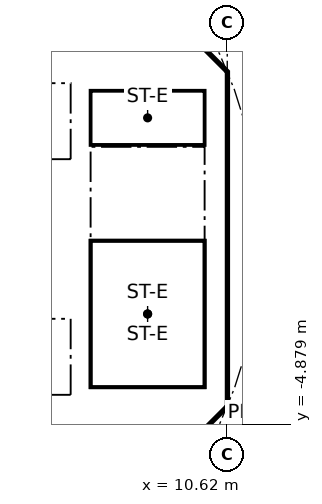
"""IFC4 building model, lengths in metres.
Left out: names, types, materials, properties, quantities, classifications, styles, units other than length and angle.
Written with IfcOpenShell. Run it as: python <this file> out.ifc"""

import sys

from ifc_helpers import new_model, si_unit, direction, frame, frame_2d, origin, place, context, subcontext, project, spatial, polyline, rectangle, outline, extrude, element, fill, save


model = new_model("IFC4")
c1 = context("Model", 3, precision=1e-05, world=origin(), true_north=direction((0.0, 1.0)))
c2 = subcontext(c1, "Body", "Model", "MODEL_VIEW")
j1 = project(units=[si_unit("LENGTHUNIT", "METRE"), si_unit("PLANEANGLEUNIT", "RADIAN")], contexts=[c1])
p1 = place(None, origin())
s1 = spatial("IfcSite", under=j1, at=p1, CompositionType="ELEMENT")
p2 = place(p1, origin())
s2 = spatial("IfcBuilding", under=s1, at=p2, CompositionType="ELEMENT")
p3 = place(p2, origin())
s3 = spatial("IfcBuildingStorey", under=s2, at=p3, CompositionType="ELEMENT", Elevation=0.0)
p4 = place(p3, frame((10.325, -3.801, 0.0), z_axis=(0.0, 0.0, 1.0), x_axis=(0.0, 1.0, 0.0)))
e1 = element("IfcWall", 1, at=p4, inside=s3, PredefinedType="SHEAR", context=c2, shape_type="SweptSolid", body=[
    extrude(rectangle(XDim=7.602, YDim=0.6, at=frame_2d((3.801, 0.0))), origin(), (0.0, 0.0, 1.0), 6.7),
])
p5 = place(p4, frame((6.351, 0.0, 0.0)))
e2 = element("IfcOpeningElement", 2, at=p5, cuts=e1, PredefinedType="OPENING", context=c2, shape_type="SweptSolid", body=[
    extrude(rectangle(XDim=1.1, YDim=2.1, at=frame_2d((0.55, 1.05))), frame((0.0, 0.31, 0.0), z_axis=(0.0, -1.0, 0.0), x_axis=(1.0, 0.0, 0.0)), (0.0, 0.0, 1.0), 0.62),
])
p6 = place(p3, frame((9.988, 4.613, 0.0), z_axis=(0.0, 0.0, 1.0), x_axis=(-0.707106781187, 0.707106781187, 0.0)))
e3 = element("IfcWall", 3, at=p6, inside=s3, PredefinedType="SHEAR", context=c2, shape_type="SweptSolid", body=[
    extrude(rectangle(XDim=7.602, YDim=0.6, at=frame_2d((3.801, 0.0))), origin(), (0.0, 0.0, 1.0), 6.7),
])
p7 = place(p6, frame((3.201, 0.0, 0.0)))
e4 = element("IfcOpeningElement", 4, at=p7, cuts=e3, PredefinedType="OPENING", context=c2, shape_type="SweptSolid", body=[
    extrude(rectangle(XDim=1.2, YDim=2.1, at=frame_2d((0.6, 1.05))), frame((0.0, 0.31, 0.0), z_axis=(0.0, -1.0, 0.0), x_axis=(1.0, 0.0, 0.0)), (0.0, 0.0, 1.0), 0.62),
])
p8 = place(p3, frame((4.613, -9.988, 0.0), z_axis=(0.0, 0.0, 1.0), x_axis=(0.707106781187, 0.707106781187, 0.0)))
e5 = element("IfcWall", 5, at=p8, inside=s3, PredefinedType="SHEAR", context=c2, shape_type="SweptSolid", body=[
    extrude(rectangle(XDim=7.602, YDim=0.6, at=frame_2d((3.801, 0.0))), origin(), (0.0, 0.0, 1.0), 6.7),
])
p9 = place(p8, frame((3.201, 0.0, 0.0)))
e6 = element("IfcOpeningElement", 6, at=p9, cuts=e5, PredefinedType="OPENING", context=c2, shape_type="SweptSolid", body=[
    extrude(rectangle(XDim=1.2, YDim=2.1, at=frame_2d((0.6, 1.05))), frame((0.0, 0.31, 0.0), z_axis=(0.0, -1.0, 0.0), x_axis=(1.0, 0.0, 0.0)), (0.0, 0.0, 1.0), 0.62),
])
p10 = place(p3, frame((-6.7, 2.0, 0.0), z_axis=(0.0, 0.0, 1.0), x_axis=(1.0, 0.0, 0.0)))
e7 = element("IfcWall", 7, at=p10, inside=s3, PredefinedType="SOLIDWALL", context=c2, shape_type="SweptSolid", body=[
    extrude(rectangle(XDim=13.4, YDim=0.2, at=frame_2d((6.7, 0.0))), origin(), (0.0, 0.0, 1.0), 6.7),
])
p11 = place(p10, frame((0.65, 0.0, 0.0)))
e8 = element("IfcOpeningElement", 8, at=p11, cuts=e7, PredefinedType="OPENING", context=c2, shape_type="SweptSolid", body=[
    extrude(rectangle(XDim=1.1, YDim=2.1, at=frame_2d((0.55, 1.05))), frame((0.0, 0.11, 0.0), z_axis=(0.0, -1.0, 0.0), x_axis=(1.0, 0.0, 0.0)), (0.0, 0.0, 1.0), 0.22),
])
p12 = place(p10, frame((2.85, 0.0, 0.0)))
e9 = element("IfcOpeningElement", 9, at=p12, cuts=e7, PredefinedType="OPENING", context=c2, shape_type="SweptSolid", body=[
    extrude(rectangle(XDim=1.1, YDim=2.1, at=frame_2d((0.55, 1.05))), frame((0.0, 0.11, 0.0), z_axis=(0.0, -1.0, 0.0), x_axis=(1.0, 0.0, 0.0)), (0.0, 0.0, 1.0), 0.22),
])
p13 = place(p10, frame((5.05, 0.0, 0.0)))
e10 = element("IfcOpeningElement", 10, at=p13, cuts=e7, PredefinedType="OPENING", context=c2, shape_type="SweptSolid", body=[
    extrude(rectangle(XDim=1.1, YDim=2.1, at=frame_2d((0.55, 1.05))), frame((0.0, 0.11, 0.0), z_axis=(0.0, -1.0, 0.0), x_axis=(1.0, 0.0, 0.0)), (0.0, 0.0, 1.0), 0.22),
])
p14 = place(p10, frame((7.25, 0.0, 0.0)))
e11 = element("IfcOpeningElement", 11, at=p14, cuts=e7, PredefinedType="OPENING", context=c2, shape_type="SweptSolid", body=[
    extrude(rectangle(XDim=1.1, YDim=2.1, at=frame_2d((0.55, 1.05))), frame((0.0, 0.11, 0.0), z_axis=(0.0, -1.0, 0.0), x_axis=(1.0, 0.0, 0.0)), (0.0, 0.0, 1.0), 0.22),
])
p15 = place(p10, frame((9.45, 0.0, 0.0)))
e12 = element("IfcOpeningElement", 12, at=p15, cuts=e7, PredefinedType="OPENING", context=c2, shape_type="SweptSolid", body=[
    extrude(rectangle(XDim=1.1, YDim=2.1, at=frame_2d((0.55, 1.05))), frame((0.0, 0.11, 0.0), z_axis=(0.0, -1.0, 0.0), x_axis=(1.0, 0.0, 0.0)), (0.0, 0.0, 1.0), 0.22),
])
p16 = place(p10, frame((11.65, 0.0, 0.0)))
e13 = element("IfcOpeningElement", 13, at=p16, cuts=e7, PredefinedType="OPENING", context=c2, shape_type="SweptSolid", body=[
    extrude(rectangle(XDim=1.1, YDim=2.1, at=frame_2d((0.55, 1.05))), frame((0.0, 0.11, 0.0), z_axis=(0.0, -1.0, 0.0), x_axis=(1.0, 0.0, 0.0)), (0.0, 0.0, 1.0), 0.22),
])
p17 = place(p3, frame((6.7, 4.0, 0.0), z_axis=(0.0, 0.0, 1.0), x_axis=(1.0, 0.0, 0.0)))
e14 = element("IfcWall", 14, at=p17, inside=s3, PredefinedType="SOLIDWALL", context=c2, shape_type="SweptSolid", body=[
    extrude(rectangle(XDim=3.325, YDim=0.2, at=frame_2d((1.662, 0.0))), origin(), (0.0, 0.0, 1.0), 6.7),
])
p18 = place(p17, frame((1.25, 0.0, 0.0)))
e15 = element("IfcOpeningElement", 15, at=p18, cuts=e14, PredefinedType="OPENING", context=c2, shape_type="SweptSolid", body=[
    extrude(rectangle(XDim=1.1, YDim=2.1, at=frame_2d((0.55, 1.05))), frame((0.0, 0.11, 0.0), z_axis=(0.0, -1.0, 0.0), x_axis=(1.0, 0.0, 0.0)), (0.0, 0.0, 1.0), 0.22),
])
p19 = place(p3, frame((-6.7, -2.0, 0.0), z_axis=(0.0, 0.0, 1.0), x_axis=(1.0, 0.0, 0.0)))
e16 = element("IfcWall", 16, at=p19, inside=s3, PredefinedType="SOLIDWALL", context=c2, shape_type="SweptSolid", body=[
    extrude(rectangle(XDim=13.4, YDim=0.2, at=frame_2d((6.7, 0.0))), origin(), (0.0, 0.0, 1.0), 6.7),
])
p20 = place(p19, frame((0.65, 0.0, 0.0)))
e17 = element("IfcOpeningElement", 17, at=p20, cuts=e16, PredefinedType="OPENING", context=c2, shape_type="SweptSolid", body=[
    extrude(rectangle(XDim=1.1, YDim=2.1, at=frame_2d((0.55, 1.05))), frame((0.0, 0.11, 0.0), z_axis=(0.0, -1.0, 0.0), x_axis=(1.0, 0.0, 0.0)), (0.0, 0.0, 1.0), 0.22),
])
p21 = place(p19, frame((2.85, 0.0, 0.0)))
e18 = element("IfcOpeningElement", 18, at=p21, cuts=e16, PredefinedType="OPENING", context=c2, shape_type="SweptSolid", body=[
    extrude(rectangle(XDim=1.1, YDim=2.1, at=frame_2d((0.55, 1.05))), frame((0.0, 0.11, 0.0), z_axis=(0.0, -1.0, 0.0), x_axis=(1.0, 0.0, 0.0)), (0.0, 0.0, 1.0), 0.22),
])
p22 = place(p19, frame((5.05, 0.0, 0.0)))
e19 = element("IfcOpeningElement", 19, at=p22, cuts=e16, PredefinedType="OPENING", context=c2, shape_type="SweptSolid", body=[
    extrude(rectangle(XDim=1.1, YDim=2.1, at=frame_2d((0.55, 1.05))), frame((0.0, 0.11, 0.0), z_axis=(0.0, -1.0, 0.0), x_axis=(1.0, 0.0, 0.0)), (0.0, 0.0, 1.0), 0.22),
])
p23 = place(p19, frame((7.25, 0.0, 0.0)))
e20 = element("IfcOpeningElement", 20, at=p23, cuts=e16, PredefinedType="OPENING", context=c2, shape_type="SweptSolid", body=[
    extrude(rectangle(XDim=1.1, YDim=2.1, at=frame_2d((0.55, 1.05))), frame((0.0, 0.11, 0.0), z_axis=(0.0, -1.0, 0.0), x_axis=(1.0, 0.0, 0.0)), (0.0, 0.0, 1.0), 0.22),
])
p24 = place(p19, frame((9.45, 0.0, 0.0)))
e21 = element("IfcOpeningElement", 21, at=p24, cuts=e16, PredefinedType="OPENING", context=c2, shape_type="SweptSolid", body=[
    extrude(rectangle(XDim=1.1, YDim=2.1, at=frame_2d((0.55, 1.05))), frame((0.0, 0.11, 0.0), z_axis=(0.0, -1.0, 0.0), x_axis=(1.0, 0.0, 0.0)), (0.0, 0.0, 1.0), 0.22),
])
p25 = place(p19, frame((11.65, 0.0, 0.0)))
e22 = element("IfcOpeningElement", 22, at=p25, cuts=e16, PredefinedType="OPENING", context=c2, shape_type="SweptSolid", body=[
    extrude(rectangle(XDim=1.1, YDim=2.1, at=frame_2d((0.55, 1.05))), frame((0.0, 0.11, 0.0), z_axis=(0.0, -1.0, 0.0), x_axis=(1.0, 0.0, 0.0)), (0.0, 0.0, 1.0), 0.22),
])
p26 = place(p3, origin())
e23 = element("IfcWall", 23, at=p26, inside=s3, PredefinedType="SHEAR", context=c2, shape_type="SweptSolid", body=[
    extrude(outline(polyline([(10.2, -4.825), (9.776, -4.401), (10.025, -4.152), (10.025, -3.801), (10.625, -3.801), (10.625, -4.401), (10.2, -4.825)])), origin(), (0.0, 0.0, 1.0), 6.7),
])
p27 = place(p3, origin())
e24 = element("IfcWall", 24, at=p27, inside=s3, PredefinedType="SHEAR", context=c2, shape_type="SweptSolid", body=[
    extrude(outline(polyline([(10.625, 3.801), (10.025, 3.801), (10.025, 4.152), (9.776, 4.401), (10.2, 4.825), (10.625, 4.401), (10.625, 3.801)])), origin(), (0.0, 0.0, 1.0), 6.7),
])
p28 = place(p3, origin())
e25 = element("IfcWall", 25, at=p28, inside=s3, PredefinedType="SOLIDWALL", context=c2, shape_type="SweptSolid", body=[
    extrude(outline(polyline([(-6.7, -2.1), (-6.5, -2.1), (-6.5, -4.1), (-4.5, -4.1), (-4.5, -2.1), (-4.3, -2.1), (-4.3, -4.1), (-2.3, -4.1), (-2.3, -2.1), (-2.1, -2.1), (-2.1, -4.1), (-0.1, -4.1), (-0.1, -2.1), (0.1, -2.1), (0.1, -4.1), (2.1, -4.1), (2.1, -2.1), (2.3, -2.1), (2.3, -4.1), (4.3, -4.1), (4.3, -2.1), (4.5, -2.1), (4.5, -4.1), (6.5, -4.1), (6.5, -2.1), (6.7, -2.1), (6.7, -4.3), (-6.7, -4.3), (-6.7, -2.1)])), origin(), (0.0, 0.0, 1.0), 6.7),
])
p29 = place(p3, origin())
e26 = element("IfcWall", 26, at=p29, inside=s3, PredefinedType="SOLIDWALL", context=c2, shape_type="SweptSolid", body=[
    extrude(outline(polyline([(-6.5, 2.1), (-6.7, 2.1), (-6.7, 4.3), (6.7, 4.3), (6.7, 2.1), (6.5, 2.1), (6.5, 4.1), (4.5, 4.1), (4.5, 2.1), (4.3, 2.1), (4.3, 4.1), (2.3, 4.1), (2.3, 2.1), (2.1, 2.1), (2.1, 4.1), (0.1, 4.1), (0.1, 2.1), (-0.1, 2.1), (-0.1, 4.1), (-2.1, 4.1), (-2.1, 2.1), (-2.3, 2.1), (-2.3, 4.1), (-4.3, 4.1), (-4.3, 2.1), (-4.5, 2.1), (-4.5, 4.1), (-6.5, 4.1), (-6.5, 2.1)])), origin(), (0.0, 0.0, 1.0), 6.7),
])
p30 = place(p3, origin())
e27 = element("IfcWall", 27, at=p30, inside=s3, PredefinedType="SOLIDWALL", context=c2, shape_type="SweptSolid", body=[
    extrude(outline(polyline([(7.025, -3.9), (6.7, -3.9), (6.7, 3.9), (7.025, 3.9), (7.025, -3.9)])), origin(), (0.0, 0.0, 1.0), 6.7),
])
p31 = place(p3, origin())
e28 = element("IfcWall", 28, at=p31, inside=s3, PredefinedType="SOLIDWALL", context=c2, shape_type="SweptSolid", body=[
    extrude(outline(polyline([(10.025, -4.1), (6.7, -4.1), (6.7, -3.9), (10.025, -3.9), (10.025, -4.1)])), origin(), (0.0, 0.0, 1.0), 6.7),
])
p32 = place(p16, origin())
e29 = element("IfcDoor", 29, at=p32, inside=s3, OperationType="DOUBLE_DOOR_SLIDING", PredefinedType="DOOR", context=c2, shape_type="SweptSolid", body=[
    extrude(rectangle(XDim=1.1, YDim=2.1, at=frame_2d((0.55, 1.05))), frame((0.0, 0.025, 0.0), z_axis=(0.0, -1.0, 0.0), x_axis=(1.0, 0.0, 0.0)), (0.0, 0.0, 1.0), 0.05),
])
fill(e13, e29)
p33 = place(p25, origin())
e30 = element("IfcDoor", 30, at=p33, inside=s3, OperationType="DOUBLE_DOOR_SLIDING", PredefinedType="DOOR", context=c2, shape_type="SweptSolid", body=[
    extrude(rectangle(XDim=1.1, YDim=2.1, at=frame_2d((0.55, 1.05))), frame((0.0, 0.025, 0.0), z_axis=(0.0, -1.0, 0.0), x_axis=(1.0, 0.0, 0.0)), (0.0, 0.0, 1.0), 0.05),
])
fill(e22, e30)
p34 = place(p18, frame((1.1, 0.0, 0.0), x_axis=(-1.0, 0.0, 0.0)))
e31 = element("IfcDoor", 31, at=p34, inside=s3, OperationType="SINGLE_SWING_RIGHT", PredefinedType="DOOR", context=c2, shape_type="SweptSolid", body=[
    extrude(rectangle(XDim=1.1, YDim=2.1, at=frame_2d((0.55, 1.05))), frame((0.0, 0.025, 0.0), z_axis=(0.0, -1.0, 0.0), x_axis=(1.0, 0.0, 0.0)), (0.0, 0.0, 1.0), 0.05),
])
fill(e15, e31)
p35 = place(p5, frame((1.1, 0.0, 0.0), x_axis=(-1.0, 0.0, 0.0)))
e32 = element("IfcDoor", 32, at=p35, inside=s3, OperationType="SINGLE_SWING_LEFT", PredefinedType="DOOR", context=c2, shape_type="SweptSolid", body=[
    extrude(rectangle(XDim=1.1, YDim=2.1, at=frame_2d((0.55, 1.05))), frame((0.0, 0.025, 0.0), z_axis=(0.0, -1.0, 0.0), x_axis=(1.0, 0.0, 0.0)), (0.0, 0.0, 1.0), 0.05),
])
fill(e2, e32)
save(model, sys.argv[1])
